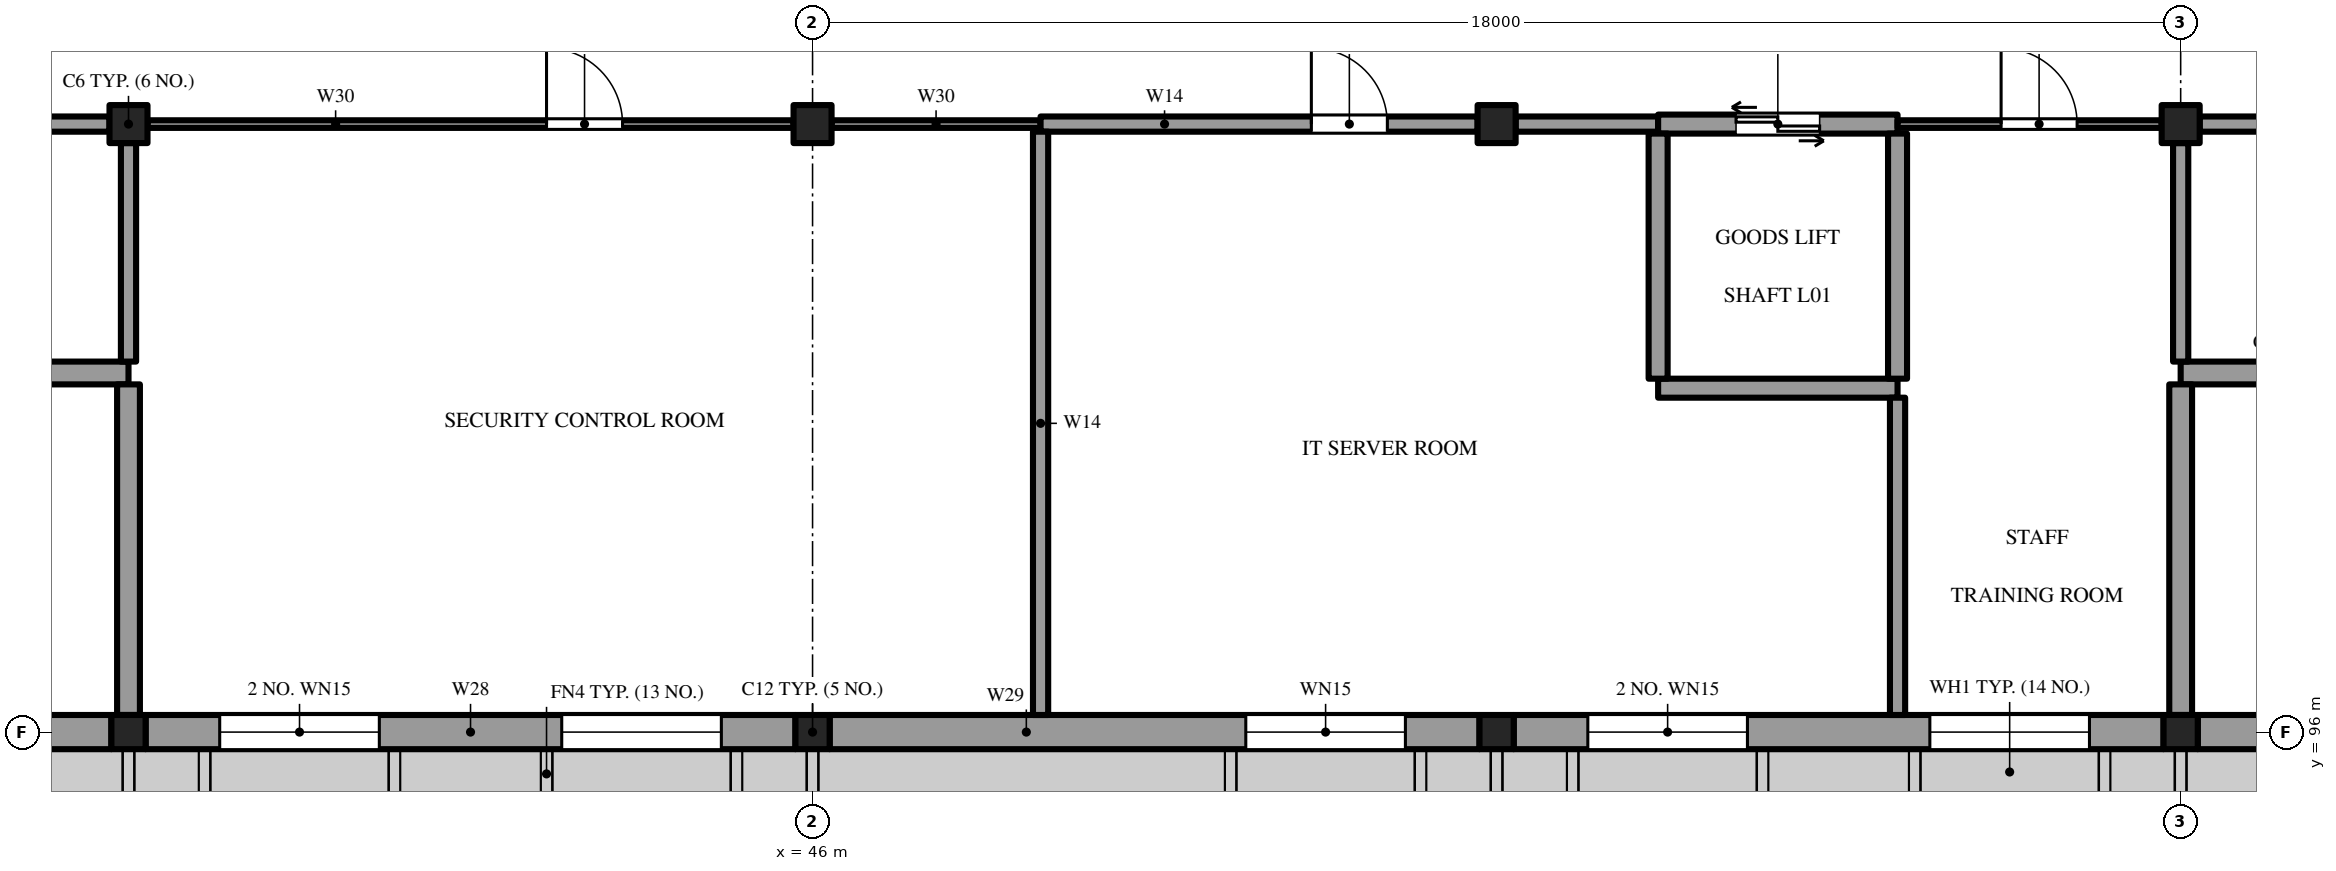
"""IFC4 building model, lengths in metres.
Left out: names, types, materials, properties, quantities, classifications, styles, units other than length and angle.
Written with IfcOpenShell. Run it as: python <this file> out.ifc"""

import sys

from ifc_helpers import new_model, si_unit, direction, frame, frame_2d, origin, origin_2d, place, context, subcontext, project, spatial, rectangle, extrude, element, fill, save


model = new_model("IFC4")
c1 = context("Model", 3, precision=1e-05, world=origin(), true_north=direction((0.0, 1.0)))
c2 = subcontext(c1, "Body", "Model", "MODEL_VIEW")
j1 = project(units=[si_unit("LENGTHUNIT", "METRE"), si_unit("PLANEANGLEUNIT", "RADIAN")], contexts=[c1])
p1 = place(None, origin())
s1 = spatial("IfcSite", under=j1, at=p1, CompositionType="ELEMENT")
p2 = place(p1, origin())
s2 = spatial("IfcBuilding", under=s1, at=p2, CompositionType="ELEMENT")
p3 = place(p2, frame((0.0, 0.0, 7.2)))
s3 = spatial("IfcBuildingStorey", under=s2, at=p3, CompositionType="ELEMENT", Elevation=7.2)
p4 = place(p3, frame((37.0, 96.0, 0.0), z_axis=(0.0, 0.0, 1.0), x_axis=(1.0, 0.0, 0.0)))
e1 = element("IfcColumn", 1, at=p4, inside=s3, PredefinedType="COLUMN", context=c2, shape_type="SweptSolid", body=[
    extrude(rectangle(XDim=0.45, YDim=0.45, at=origin_2d()), origin(), (0.0, 0.0, 1.0), 4.8),
])
p5 = place(p3, frame((37.0, 104.0, 0.0), z_axis=(0.0, 0.0, 1.0), x_axis=(1.0, 0.0, 0.0)))
e2 = element("IfcColumn", 2, at=p5, inside=s3, PredefinedType="COLUMN", context=c2, shape_type="SweptSolid", body=[
    extrude(rectangle(XDim=0.5, YDim=0.5, at=origin_2d()), origin(), (0.0, 0.0, 1.0), 4.8),
])
p6 = place(p3, frame((46.0, 96.0, 0.0), z_axis=(0.0, 0.0, 1.0), x_axis=(1.0, 0.0, 0.0)))
e3 = element("IfcColumn", 3, at=p6, inside=s3, PredefinedType="COLUMN", context=c2, shape_type="SweptSolid", body=[
    extrude(rectangle(XDim=0.45, YDim=0.45, at=origin_2d()), origin(), (0.0, 0.0, 1.0), 4.8),
])
p7 = place(p3, frame((46.0, 104.0, 0.0), z_axis=(0.0, 0.0, 1.0), x_axis=(1.0, 0.0, 0.0)))
e4 = element("IfcColumn", 4, at=p7, inside=s3, PredefinedType="COLUMN", context=c2, shape_type="SweptSolid", body=[
    extrude(rectangle(XDim=0.5, YDim=0.5, at=origin_2d()), origin(), (0.0, 0.0, 1.0), 4.8),
])
p8 = place(p3, frame((55.0, 96.0, 0.0), z_axis=(0.0, 0.0, 1.0), x_axis=(1.0, 0.0, 0.0)))
e5 = element("IfcColumn", 5, at=p8, inside=s3, PredefinedType="COLUMN", context=c2, shape_type="SweptSolid", body=[
    extrude(rectangle(XDim=0.45, YDim=0.45, at=origin_2d()), origin(), (0.0, 0.0, 1.0), 4.8),
])
p9 = place(p3, frame((55.0, 104.0, 0.0), z_axis=(0.0, 0.0, 1.0), x_axis=(1.0, 0.0, 0.0)))
e6 = element("IfcColumn", 6, at=p9, inside=s3, PredefinedType="COLUMN", context=c2, shape_type="SweptSolid", body=[
    extrude(rectangle(XDim=0.5, YDim=0.5, at=origin_2d()), origin(), (0.0, 0.0, 1.0), 4.8),
])
p10 = place(p3, frame((64.0, 96.0, 0.0), z_axis=(0.0, 0.0, 1.0), x_axis=(1.0, 0.0, 0.0)))
e7 = element("IfcColumn", 7, at=p10, inside=s3, PredefinedType="COLUMN", context=c2, shape_type="SweptSolid", body=[
    extrude(rectangle(XDim=0.45, YDim=0.45, at=origin_2d()), origin(), (0.0, 0.0, 1.0), 4.8),
])
p11 = place(p3, frame((64.0, 104.0, 0.0), z_axis=(0.0, 0.0, 1.0), x_axis=(1.0, 0.0, 0.0)))
e8 = element("IfcColumn", 8, at=p11, inside=s3, PredefinedType="COLUMN", context=c2, shape_type="SweptSolid", body=[
    extrude(rectangle(XDim=0.5, YDim=0.5, at=origin_2d()), origin(), (0.0, 0.0, 1.0), 4.8),
])
p12 = place(p3, frame((28.225, 96.0, 0.0), z_axis=(0.0, 0.0, 1.0), x_axis=(1.0, 0.0, 0.0)))
e9 = element("IfcWall", 9, at=p12, inside=s3, PredefinedType="SOLIDWALL", context=c2, shape_type="SweptSolid", body=[
    extrude(rectangle(XDim=8.55, YDim=0.45, at=frame_2d((4.275, 0.0))), origin(), (0.0, 0.0, 1.0), 4.5),
])
p13 = place(p3, frame((37.225, 96.0, 0.0), z_axis=(0.0, 0.0, 1.0), x_axis=(1.0, 0.0, 0.0)))
e10 = element("IfcWall", 10, at=p13, inside=s3, PredefinedType="SOLIDWALL", context=c2, shape_type="SweptSolid", body=[
    extrude(rectangle(XDim=8.55, YDim=0.45, at=frame_2d((4.275, 0.0))), origin(), (0.0, 0.0, 1.0), 4.5),
])
p14 = place(p13, frame((0.975, 0.0, 0.9)))
e11 = element("IfcOpeningElement", 11, at=p14, cuts=e10, PredefinedType="OPENING", context=c2, shape_type="SweptSolid", body=[
    extrude(rectangle(XDim=2.1, YDim=2.2, at=frame_2d((1.05, 1.1))), frame((0.0, 0.235, 0.0), z_axis=(0.0, -1.0, 0.0), x_axis=(1.0, 0.0, 0.0)), (0.0, 0.0, 1.0), 0.47),
])
p15 = place(p13, frame((5.475, 0.0, 0.9)))
e12 = element("IfcOpeningElement", 12, at=p15, cuts=e10, PredefinedType="OPENING", context=c2, shape_type="SweptSolid", body=[
    extrude(rectangle(XDim=2.1, YDim=2.2, at=frame_2d((1.05, 1.1))), frame((0.0, 0.235, 0.0), z_axis=(0.0, -1.0, 0.0), x_axis=(1.0, 0.0, 0.0)), (0.0, 0.0, 1.0), 0.47),
])
p16 = place(p3, frame((46.225, 96.0, 0.0), z_axis=(0.0, 0.0, 1.0), x_axis=(1.0, 0.0, 0.0)))
e13 = element("IfcWall", 13, at=p16, inside=s3, PredefinedType="SOLIDWALL", context=c2, shape_type="SweptSolid", body=[
    extrude(rectangle(XDim=8.55, YDim=0.45, at=frame_2d((4.275, 0.0))), origin(), (0.0, 0.0, 1.0), 4.5),
])
p17 = place(p16, frame((5.475, 0.0, 0.9)))
e14 = element("IfcOpeningElement", 14, at=p17, cuts=e13, PredefinedType="OPENING", context=c2, shape_type="SweptSolid", body=[
    extrude(rectangle(XDim=2.1, YDim=2.2, at=frame_2d((1.05, 1.1))), frame((0.0, 0.235, 0.0), z_axis=(0.0, -1.0, 0.0), x_axis=(1.0, 0.0, 0.0)), (0.0, 0.0, 1.0), 0.47),
])
p18 = place(p3, frame((55.225, 96.0, 0.0), z_axis=(0.0, 0.0, 1.0), x_axis=(1.0, 0.0, 0.0)))
e15 = element("IfcWall", 15, at=p18, inside=s3, PredefinedType="SOLIDWALL", context=c2, shape_type="SweptSolid", body=[
    extrude(rectangle(XDim=8.55, YDim=0.45, at=frame_2d((4.275, 0.0))), origin(), (0.0, 0.0, 1.0), 4.5),
])
p19 = place(p18, frame((0.975, 0.0, 0.9)))
e16 = element("IfcOpeningElement", 16, at=p19, cuts=e15, PredefinedType="OPENING", context=c2, shape_type="SweptSolid", body=[
    extrude(rectangle(XDim=2.1, YDim=2.2, at=frame_2d((1.05, 1.1))), frame((0.0, 0.235, 0.0), z_axis=(0.0, -1.0, 0.0), x_axis=(1.0, 0.0, 0.0)), (0.0, 0.0, 1.0), 0.47),
])
p20 = place(p18, frame((5.475, 0.0, 0.9)))
e17 = element("IfcOpeningElement", 17, at=p20, cuts=e15, PredefinedType="OPENING", context=c2, shape_type="SweptSolid", body=[
    extrude(rectangle(XDim=2.1, YDim=2.2, at=frame_2d((1.05, 1.1))), frame((0.0, 0.235, 0.0), z_axis=(0.0, -1.0, 0.0), x_axis=(1.0, 0.0, 0.0)), (0.0, 0.0, 1.0), 0.47),
])
p21 = place(p3, frame((64.225, 96.0, 0.0), z_axis=(0.0, 0.0, 1.0), x_axis=(1.0, 0.0, 0.0)))
e18 = element("IfcWall", 18, at=p21, inside=s3, PredefinedType="SOLIDWALL", context=c2, shape_type="SweptSolid", body=[
    extrude(rectangle(XDim=8.55, YDim=0.45, at=frame_2d((4.275, 0.0))), origin(), (0.0, 0.0, 1.0), 4.5),
])
p22 = place(p3, frame((57.125, 100.525, 0.0), z_axis=(0.0, 0.0, 1.0), x_axis=(1.0, 0.0, 0.0)))
e19 = element("IfcWall", 19, at=p22, inside=s3, PredefinedType="SOLIDWALL", context=c2, shape_type="SweptSolid", body=[
    extrude(rectangle(XDim=3.15, YDim=0.25, at=frame_2d((1.575, 0.0))), origin(), (0.0, 0.0, 1.0), 4.5),
])
p23 = place(p3, frame((28.225, 100.725, 0.0), z_axis=(0.0, 0.0, 1.0), x_axis=(1.0, 0.0, 0.0)))
e20 = element("IfcWall", 20, at=p23, inside=s3, PredefinedType="SHEAR", context=c2, shape_type="SweptSolid", body=[
    extrude(rectangle(XDim=8.775, YDim=0.3, at=frame_2d((4.387, 0.0))), origin(), (0.0, 0.0, 1.0), 4.5),
])
p24 = place(p23, frame((0.525, 0.0, 0.0)))
e21 = element("IfcOpeningElement", 21, at=p24, cuts=e20, PredefinedType="OPENING", context=c2, shape_type="SweptSolid", body=[
    extrude(rectangle(XDim=1.1, YDim=2.1, at=frame_2d((0.55, 1.05))), frame((0.0, 0.16, 0.0), z_axis=(0.0, -1.0, 0.0), x_axis=(1.0, 0.0, 0.0)), (0.0, 0.0, 1.0), 0.32),
])
p25 = place(p3, frame((64.0, 100.725, 0.0), z_axis=(0.0, 0.0, 1.0), x_axis=(1.0, 0.0, 0.0)))
e22 = element("IfcWall", 22, at=p25, inside=s3, PredefinedType="SHEAR", context=c2, shape_type="SweptSolid", body=[
    extrude(rectangle(XDim=9.0, YDim=0.3, at=frame_2d((4.5, 0.0))), origin(), (0.0, 0.0, 1.0), 4.5),
])
p26 = place(p25, frame((7.25, 0.0, 0.0)))
e23 = element("IfcOpeningElement", 23, at=p26, cuts=e22, PredefinedType="OPENING", context=c2, shape_type="SweptSolid", body=[
    extrude(rectangle(XDim=1.1, YDim=2.1, at=frame_2d((0.55, 1.05))), frame((0.0, 0.16, 0.0), z_axis=(0.0, -1.0, 0.0), x_axis=(1.0, 0.0, 0.0)), (0.0, 0.0, 1.0), 0.32),
])
p27 = place(p3, frame((28.225, 104.0, 0.0), z_axis=(0.0, 0.0, 1.0), x_axis=(1.0, 0.0, 0.0)))
e24 = element("IfcWall", 24, at=p27, inside=s3, PredefinedType="SOLIDWALL", context=c2, shape_type="SweptSolid", body=[
    extrude(rectangle(XDim=8.525, YDim=0.2, at=frame_2d((4.262, 0.0))), origin(), (0.0, 0.0, 1.0), 4.5),
])
p28 = place(p27, frame((3.725, 0.0, 0.0)))
e25 = element("IfcOpeningElement", 25, at=p28, cuts=e24, PredefinedType="OPENING", context=c2, shape_type="SweptSolid", body=[
    extrude(rectangle(XDim=1.1, YDim=2.1, at=frame_2d((0.55, 1.05))), frame((0.0, 0.11, 0.0), z_axis=(0.0, -1.0, 0.0), x_axis=(1.0, 0.0, 0.0)), (0.0, 0.0, 1.0), 0.22),
])
p29 = place(p3, frame((37.25, 104.0, 0.0), z_axis=(0.0, 0.0, 1.0), x_axis=(1.0, 0.0, 0.0)))
e26 = element("IfcWall", 26, at=p29, inside=s3, PredefinedType="PARTITIONING", context=c2, shape_type="SweptSolid", body=[
    extrude(rectangle(XDim=8.5, YDim=0.1, at=frame_2d((4.25, 0.0))), origin(), (0.0, 0.0, 1.0), 4.5),
])
p30 = place(p29, frame((5.25, 0.0, 0.0)))
e27 = element("IfcOpeningElement", 27, at=p30, cuts=e26, PredefinedType="OPENING", context=c2, shape_type="SweptSolid", body=[
    extrude(rectangle(XDim=1.0, YDim=2.1, at=frame_2d((0.5, 1.05))), frame((0.0, 0.06, 0.0), z_axis=(0.0, -1.0, 0.0), x_axis=(1.0, 0.0, 0.0)), (0.0, 0.0, 1.0), 0.12),
])
p31 = place(p3, frame((46.25, 104.0, 0.0), z_axis=(0.0, 0.0, 1.0), x_axis=(1.0, 0.0, 0.0)))
e28 = element("IfcWall", 28, at=p31, inside=s3, PredefinedType="PARTITIONING", context=c2, shape_type="SweptSolid", body=[
    extrude(rectangle(XDim=2.75, YDim=0.1, at=frame_2d((1.375, 0.0))), origin(), (0.0, 0.0, 1.0), 4.5),
])
p32 = place(p3, frame((49.0, 104.0, 0.0), z_axis=(0.0, 0.0, 1.0), x_axis=(1.0, 0.0, 0.0)))
e29 = element("IfcWall", 29, at=p32, inside=s3, PredefinedType="SOLIDWALL", context=c2, shape_type="SweptSolid", body=[
    extrude(rectangle(XDim=5.75, YDim=0.2, at=frame_2d((2.875, 0.0))), origin(), (0.0, 0.0, 1.0), 4.5),
])
p33 = place(p32, frame((3.562, 0.0, 0.0)))
e30 = element("IfcOpeningElement", 30, at=p33, cuts=e29, PredefinedType="OPENING", context=c2, shape_type="SweptSolid", body=[
    extrude(rectangle(XDim=1.0, YDim=2.1, at=frame_2d((0.5, 1.05))), frame((0.0, 0.11, 0.0), z_axis=(0.0, -1.0, 0.0), x_axis=(1.0, 0.0, 0.0)), (0.0, 0.0, 1.0), 0.22),
])
p34 = place(p3, frame((55.25, 104.0, 0.0), z_axis=(0.0, 0.0, 1.0), x_axis=(1.0, 0.0, 0.0)))
e31 = element("IfcWall", 31, at=p34, inside=s3, PredefinedType="SOLIDWALL", context=c2, shape_type="SweptSolid", body=[
    extrude(rectangle(XDim=1.875, YDim=0.2, at=frame_2d((0.938, 0.0))), origin(), (0.0, 0.0, 1.0), 4.5),
])
p35 = place(p3, frame((57.125, 104.0, 0.0), z_axis=(0.0, 0.0, 1.0), x_axis=(1.0, 0.0, 0.0)))
e32 = element("IfcWall", 32, at=p35, inside=s3, PredefinedType="SOLIDWALL", context=c2, shape_type="SweptSolid", body=[
    extrude(rectangle(XDim=3.15, YDim=0.25, at=frame_2d((1.575, 0.0))), origin(), (0.0, 0.0, 1.0), 4.5),
])
p36 = place(p35, frame((1.025, 0.0, 0.0)))
e33 = element("IfcOpeningElement", 33, at=p36, cuts=e32, PredefinedType="OPENING", context=c2, shape_type="SweptSolid", body=[
    extrude(rectangle(XDim=1.1, YDim=2.1, at=frame_2d((0.55, 1.05))), frame((0.0, 0.135, 0.0), z_axis=(0.0, -1.0, 0.0), x_axis=(1.0, 0.0, 0.0)), (0.0, 0.0, 1.0), 0.27),
])
p37 = place(p3, frame((60.275, 104.0, 0.0), z_axis=(0.0, 0.0, 1.0), x_axis=(1.0, 0.0, 0.0)))
e34 = element("IfcWall", 34, at=p37, inside=s3, PredefinedType="PARTITIONING", context=c2, shape_type="SweptSolid", body=[
    extrude(rectangle(XDim=3.475, YDim=0.1, at=frame_2d((1.738, 0.0))), origin(), (0.0, 0.0, 1.0), 4.5),
])
p38 = place(p37, frame((1.363, 0.0, 0.0)))
e35 = element("IfcOpeningElement", 35, at=p38, cuts=e34, PredefinedType="OPENING", context=c2, shape_type="SweptSolid", body=[
    extrude(rectangle(XDim=1.0, YDim=2.1, at=frame_2d((0.5, 1.05))), frame((0.0, 0.06, 0.0), z_axis=(0.0, -1.0, 0.0), x_axis=(1.0, 0.0, 0.0)), (0.0, 0.0, 1.0), 0.12),
])
p39 = place(p3, frame((64.25, 104.0, 0.0), z_axis=(0.0, 0.0, 1.0), x_axis=(1.0, 0.0, 0.0)))
e36 = element("IfcWall", 36, at=p39, inside=s3, PredefinedType="SOLIDWALL", context=c2, shape_type="SweptSolid", body=[
    extrude(rectangle(XDim=8.525, YDim=0.2, at=frame_2d((4.262, 0.0))), origin(), (0.0, 0.0, 1.0), 4.5),
])
p40 = place(p39, frame((3.7, 0.0, 0.0)))
e37 = element("IfcOpeningElement", 37, at=p40, cuts=e36, PredefinedType="OPENING", context=c2, shape_type="SweptSolid", body=[
    extrude(rectangle(XDim=1.1, YDim=2.1, at=frame_2d((0.55, 1.05))), frame((0.0, 0.11, 0.0), z_axis=(0.0, -1.0, 0.0), x_axis=(1.0, 0.0, 0.0)), (0.0, 0.0, 1.0), 0.22),
])
p41 = place(p3, frame((37.0, 96.225, 0.0), z_axis=(0.0, 0.0, 1.0), x_axis=(0.0, 1.0, 0.0)))
e38 = element("IfcWall", 38, at=p41, inside=s3, PredefinedType="SHEAR", context=c2, shape_type="SweptSolid", body=[
    extrude(rectangle(XDim=4.35, YDim=0.3, at=frame_2d((2.175, 0.0))), origin(), (0.0, 0.0, 1.0), 4.5),
])
p42 = place(p3, frame((37.0, 100.875, 0.0), z_axis=(0.0, 0.0, 1.0), x_axis=(0.0, 1.0, 0.0)))
e39 = element("IfcWall", 39, at=p42, inside=s3, PredefinedType="SOLIDWALL", context=c2, shape_type="SweptSolid", body=[
    extrude(rectangle(XDim=2.875, YDim=0.2, at=frame_2d((1.438, 0.0))), origin(), (0.0, 0.0, 1.0), 4.5),
])
p43 = place(p3, frame((49.0, 96.225, 0.0), z_axis=(0.0, 0.0, 1.0), x_axis=(0.0, 1.0, 0.0)))
e40 = element("IfcWall", 40, at=p43, inside=s3, PredefinedType="SOLIDWALL", context=c2, shape_type="SweptSolid", body=[
    extrude(rectangle(XDim=7.675, YDim=0.2, at=frame_2d((3.837, 0.0))), origin(), (0.0, 0.0, 1.0), 4.5),
])
p44 = place(p3, frame((57.125, 100.65, 0.0), z_axis=(0.0, 0.0, 1.0), x_axis=(0.0, 1.0, 0.0)))
e41 = element("IfcWall", 41, at=p44, inside=s3, PredefinedType="SOLIDWALL", context=c2, shape_type="SweptSolid", body=[
    extrude(rectangle(XDim=3.225, YDim=0.25, at=frame_2d((1.613, 0.0))), origin(), (0.0, 0.0, 1.0), 4.5),
])
p45 = place(p3, frame((60.275, 96.225, 0.0), z_axis=(0.0, 0.0, 1.0), x_axis=(0.0, 1.0, 0.0)))
e42 = element("IfcWall", 42, at=p45, inside=s3, PredefinedType="SOLIDWALL", context=c2, shape_type="SweptSolid", body=[
    extrude(rectangle(XDim=4.175, YDim=0.2, at=frame_2d((2.087, 0.0))), origin(), (0.0, 0.0, 1.0), 4.5),
])
p46 = place(p3, frame((60.275, 100.65, 0.0), z_axis=(0.0, 0.0, 1.0), x_axis=(0.0, 1.0, 0.0)))
e43 = element("IfcWall", 43, at=p46, inside=s3, PredefinedType="SOLIDWALL", context=c2, shape_type="SweptSolid", body=[
    extrude(rectangle(XDim=3.225, YDim=0.25, at=frame_2d((1.613, 0.0))), origin(), (0.0, 0.0, 1.0), 4.5),
])
p47 = place(p3, frame((64.0, 96.225, 0.0), z_axis=(0.0, 0.0, 1.0), x_axis=(0.0, 1.0, 0.0)))
e44 = element("IfcWall", 44, at=p47, inside=s3, PredefinedType="SHEAR", context=c2, shape_type="SweptSolid", body=[
    extrude(rectangle(XDim=4.35, YDim=0.3, at=frame_2d((2.175, 0.0))), origin(), (0.0, 0.0, 1.0), 4.5),
])
p48 = place(p3, frame((64.0, 100.875, 0.0), z_axis=(0.0, 0.0, 1.0), x_axis=(0.0, 1.0, 0.0)))
e45 = element("IfcWall", 45, at=p48, inside=s3, PredefinedType="SOLIDWALL", context=c2, shape_type="SweptSolid", body=[
    extrude(rectangle(XDim=2.875, YDim=0.2, at=frame_2d((1.438, 0.0))), origin(), (0.0, 0.0, 1.0), 4.5),
])
p49 = place(p30, origin())
e46 = element("IfcDoor", 46, at=p49, inside=s3, OperationType="SINGLE_SWING_LEFT", PredefinedType="DOOR", context=c2, shape_type="SweptSolid", body=[
    extrude(rectangle(XDim=1.0, YDim=2.1, at=frame_2d((0.5, 1.05))), frame((0.0, 0.025, 0.0), z_axis=(0.0, -1.0, 0.0), x_axis=(1.0, 0.0, 0.0)), (0.0, 0.0, 1.0), 0.05),
])
fill(e27, e46)
p50 = place(p33, origin())
e47 = element("IfcDoor", 47, at=p50, inside=s3, OperationType="SINGLE_SWING_RIGHT", PredefinedType="DOOR", context=c2, shape_type="SweptSolid", body=[
    extrude(rectangle(XDim=1.0, YDim=2.1, at=frame_2d((0.5, 1.05))), frame((0.0, 0.025, 0.0), z_axis=(0.0, -1.0, 0.0), x_axis=(1.0, 0.0, 0.0)), (0.0, 0.0, 1.0), 0.05),
])
fill(e30, e47)
p51 = place(p38, origin())
e48 = element("IfcDoor", 48, at=p51, inside=s3, OperationType="SINGLE_SWING_LEFT", PredefinedType="DOOR", context=c2, shape_type="SweptSolid", body=[
    extrude(rectangle(XDim=1.0, YDim=2.1, at=frame_2d((0.5, 1.05))), frame((0.0, 0.025, 0.0), z_axis=(0.0, -1.0, 0.0), x_axis=(1.0, 0.0, 0.0)), (0.0, 0.0, 1.0), 0.05),
])
fill(e35, e48)
p52 = place(p36, origin())
e49 = element("IfcDoor", 49, at=p52, inside=s3, OperationType="DOUBLE_DOOR_SLIDING", PredefinedType="DOOR", context=c2, shape_type="SweptSolid", body=[
    extrude(rectangle(XDim=1.1, YDim=2.1, at=frame_2d((0.55, 1.05))), frame((0.0, 0.025, 0.0), z_axis=(0.0, -1.0, 0.0), x_axis=(1.0, 0.0, 0.0)), (0.0, 0.0, 1.0), 0.05),
])
fill(e33, e49)
p53 = place(p14, origin())
e50 = element("IfcWindow", 50, at=p53, inside=s3, PartitioningType="SINGLE_PANEL", PredefinedType="WINDOW", context=c2, shape_type="SweptSolid", body=[
    extrude(rectangle(XDim=2.1, YDim=2.2, at=frame_2d((1.05, 1.1))), frame((0.0, 0.215, 0.0), z_axis=(0.0, -1.0, 0.0), x_axis=(1.0, 0.0, 0.0)), (0.0, 0.0, 1.0), 0.06),
])
fill(e11, e50)
p54 = place(p15, origin())
e51 = element("IfcWindow", 51, at=p54, inside=s3, PartitioningType="SINGLE_PANEL", PredefinedType="WINDOW", context=c2, shape_type="SweptSolid", body=[
    extrude(rectangle(XDim=2.1, YDim=2.2, at=frame_2d((1.05, 1.1))), frame((0.0, 0.215, 0.0), z_axis=(0.0, -1.0, 0.0), x_axis=(1.0, 0.0, 0.0)), (0.0, 0.0, 1.0), 0.06),
])
fill(e12, e51)
p55 = place(p17, origin())
e52 = element("IfcWindow", 52, at=p55, inside=s3, PartitioningType="SINGLE_PANEL", PredefinedType="WINDOW", context=c2, shape_type="SweptSolid", body=[
    extrude(rectangle(XDim=2.1, YDim=2.2, at=frame_2d((1.05, 1.1))), frame((0.0, 0.215, 0.0), z_axis=(0.0, -1.0, 0.0), x_axis=(1.0, 0.0, 0.0)), (0.0, 0.0, 1.0), 0.06),
])
fill(e14, e52)
p56 = place(p19, origin())
e53 = element("IfcWindow", 53, at=p56, inside=s3, PartitioningType="SINGLE_PANEL", PredefinedType="WINDOW", context=c2, shape_type="SweptSolid", body=[
    extrude(rectangle(XDim=2.1, YDim=2.2, at=frame_2d((1.05, 1.1))), frame((0.0, 0.215, 0.0), z_axis=(0.0, -1.0, 0.0), x_axis=(1.0, 0.0, 0.0)), (0.0, 0.0, 1.0), 0.06),
])
fill(e16, e53)
p57 = place(p20, origin())
e54 = element("IfcWindow", 54, at=p57, inside=s3, PartitioningType="SINGLE_PANEL", PredefinedType="WINDOW", context=c2, shape_type="SweptSolid", body=[
    extrude(rectangle(XDim=2.1, YDim=2.2, at=frame_2d((1.05, 1.1))), frame((0.0, 0.215, 0.0), z_axis=(0.0, -1.0, 0.0), x_axis=(1.0, 0.0, 0.0)), (0.0, 0.0, 1.0), 0.06),
])
fill(e17, e54)
save(model, sys.argv[1])
